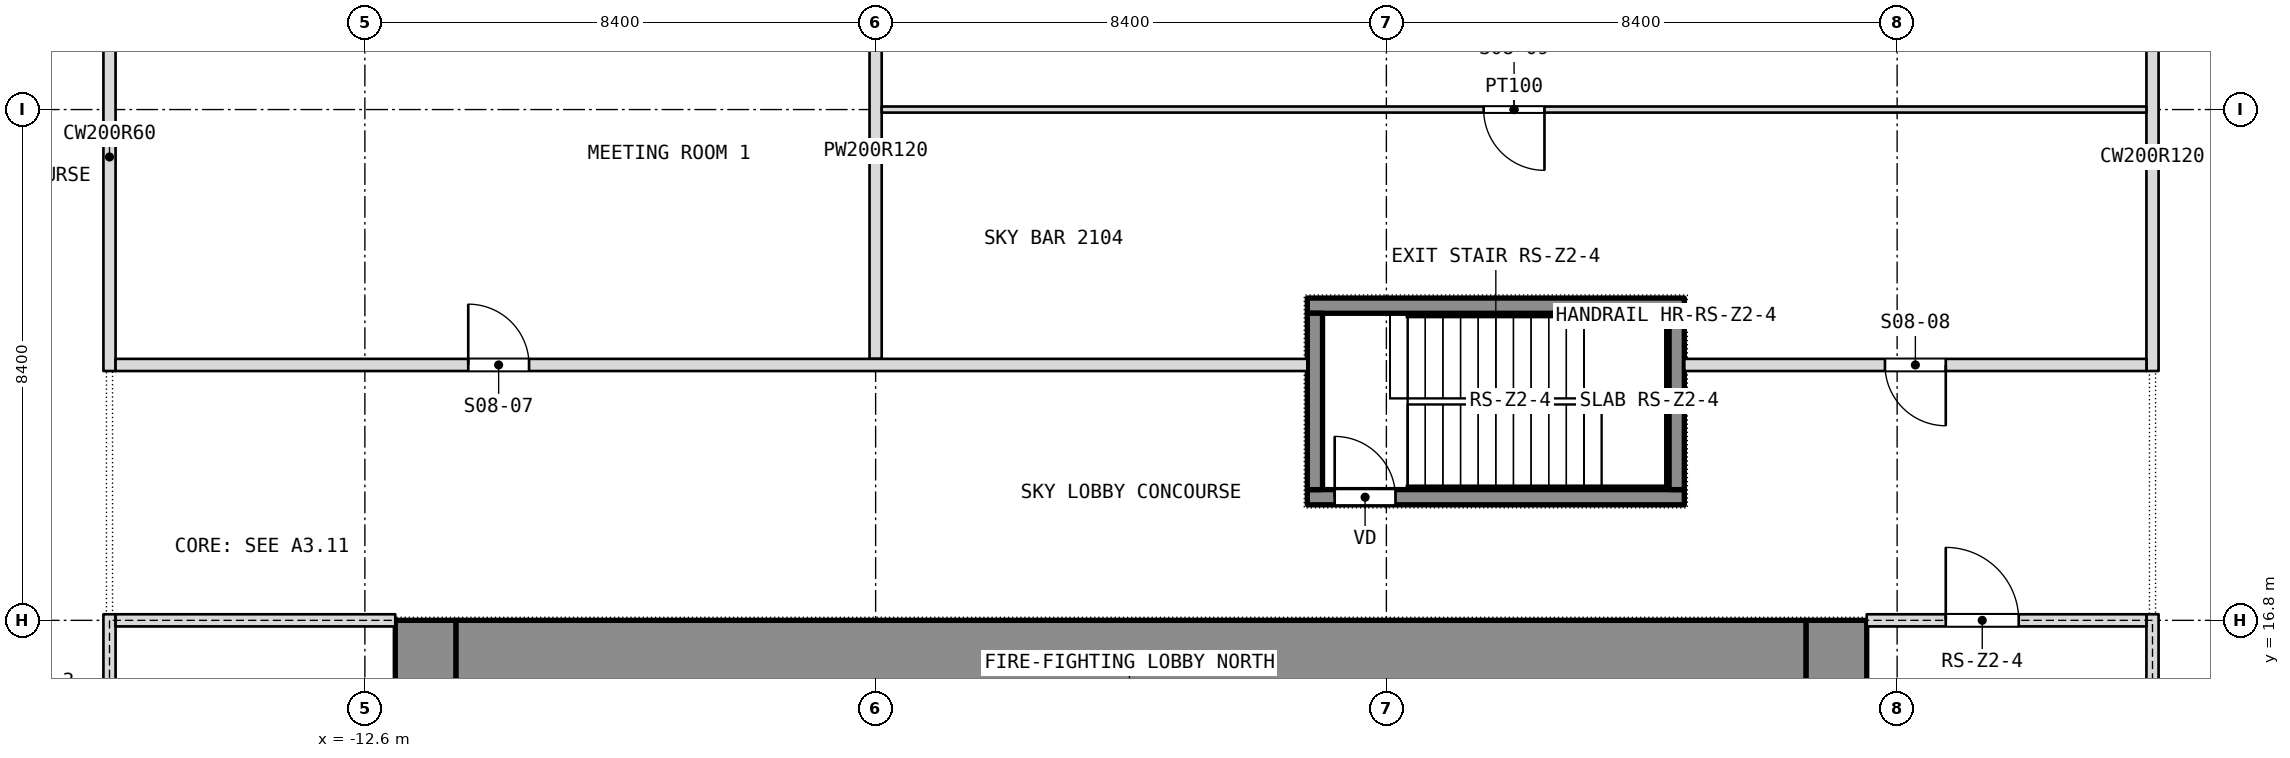
"""IFC4 building model, lengths in metres.
Left out: names, types, materials, properties, quantities, classifications, styles, units other than length and angle.
Written with IfcOpenShell. Run it as: python <this file> out.ifc"""

import sys

from ifc_helpers import new_model, si_unit, direction, frame, frame_2d, origin, place, context, subcontext, project, spatial, rectangle, extrude, element, fill, save


model = new_model("IFC4")
c1 = context("Model", 3, precision=1e-05, world=origin(), true_north=direction((0.0, 1.0)))
c2 = subcontext(c1, "Body", "Model", "MODEL_VIEW")
j1 = project(units=[si_unit("LENGTHUNIT", "METRE"), si_unit("PLANEANGLEUNIT", "RADIAN")], contexts=[c1])
p1 = place(None, origin())
s1 = spatial("IfcSite", under=j1, at=p1, CompositionType="ELEMENT")
p2 = place(p1, origin())
s2 = spatial("IfcBuilding", under=s1, at=p2, CompositionType="ELEMENT")
p3 = place(p2, frame((0.0, 0.0, 97.7)))
s3 = spatial("IfcBuildingStorey", under=s2, at=p3, CompositionType="ELEMENT", Elevation=97.7)
p4 = place(p3, frame((11.6, 0.0, 0.0), z_axis=(0.0, 0.0, 1.0), x_axis=(0.0, 1.0, 0.0)))
e1 = element("IfcWall", 1, at=p4, inside=s3, PredefinedType="SHEAR", context=c2, shape_type="SweptSolid", body=[
    extrude(rectangle(XDim=16.8, YDim=1.0, at=frame_2d((8.4, 0.0))), origin(), (0.0, 0.0, 1.0), 7.2),
])
p5 = place(p4, frame((2.3, 0.0, 0.0)))
e2 = element("IfcOpeningElement", 2, at=p5, cuts=e1, PredefinedType="OPENING", context=c2, shape_type="SweptSolid", body=[
    extrude(rectangle(XDim=1.1, YDim=2.1, at=frame_2d((0.55, 1.05))), frame((0.0, 0.5, 0.0), z_axis=(0.0, -1.0, 0.0), x_axis=(1.0, 0.0, 0.0)), (0.0, 0.0, 1.0), 1.0),
])
p6 = place(p4, frame((4.85, 0.0, 0.0)))
e3 = element("IfcOpeningElement", 3, at=p6, cuts=e1, PredefinedType="OPENING", context=c2, shape_type="SweptSolid", body=[
    extrude(rectangle(XDim=1.1, YDim=2.1, at=frame_2d((0.55, 1.05))), frame((0.0, 0.5, 0.0), z_axis=(0.0, -1.0, 0.0), x_axis=(1.0, 0.0, 0.0)), (0.0, 0.0, 1.0), 1.0),
])
p7 = place(p4, frame((6.825, 0.0, 0.0)))
e4 = element("IfcOpeningElement", 4, at=p7, cuts=e1, PredefinedType="OPENING", context=c2, shape_type="SweptSolid", body=[
    extrude(rectangle(XDim=1.2, YDim=2.1, at=frame_2d((0.6, 1.05))), frame((0.0, 0.5, 0.0), z_axis=(0.0, -1.0, 0.0), x_axis=(1.0, 0.0, 0.0)), (0.0, 0.0, 1.0), 1.0),
])
p8 = place(p4, frame((13.4, 0.0, 0.0)))
e5 = element("IfcOpeningElement", 5, at=p8, cuts=e1, PredefinedType="OPENING", context=c2, shape_type="SweptSolid", body=[
    extrude(rectangle(XDim=1.1, YDim=2.1, at=frame_2d((0.55, 1.05))), frame((0.0, 0.5, 0.0), z_axis=(0.0, -1.0, 0.0), x_axis=(1.0, 0.0, 0.0)), (0.0, 0.0, 1.0), 1.0),
])
p9 = place(p4, frame((10.85, 0.0, 0.0)))
e6 = element("IfcOpeningElement", 6, at=p9, cuts=e1, PredefinedType="OPENING", context=c2, shape_type="SweptSolid", body=[
    extrude(rectangle(XDim=1.1, YDim=2.1, at=frame_2d((0.55, 1.05))), frame((0.0, 0.5, 0.0), z_axis=(0.0, -1.0, 0.0), x_axis=(1.0, 0.0, 0.0)), (0.0, 0.0, 1.0), 1.0),
])
p10 = place(p4, frame((8.775, 0.0, 0.0)))
e7 = element("IfcOpeningElement", 7, at=p10, cuts=e1, PredefinedType="OPENING", context=c2, shape_type="SweptSolid", body=[
    extrude(rectangle(XDim=1.2, YDim=2.1, at=frame_2d((0.6, 1.05))), frame((0.0, 0.5, 0.0), z_axis=(0.0, -1.0, 0.0), x_axis=(1.0, 0.0, 0.0)), (0.0, 0.0, 1.0), 1.0),
])
p11 = place(p3, frame((-11.6, 0.0, 0.0), z_axis=(0.0, 0.0, 1.0), x_axis=(0.0, 1.0, 0.0)))
e8 = element("IfcWall", 8, at=p11, inside=s3, PredefinedType="SHEAR", context=c2, shape_type="SweptSolid", body=[
    extrude(rectangle(XDim=16.8, YDim=1.0, at=frame_2d((8.4, 0.0))), origin(), (0.0, 0.0, 1.0), 7.2),
])
p12 = place(p11, frame((2.3, 0.0, 0.0)))
e9 = element("IfcOpeningElement", 9, at=p12, cuts=e8, PredefinedType="OPENING", context=c2, shape_type="SweptSolid", body=[
    extrude(rectangle(XDim=1.1, YDim=2.1, at=frame_2d((0.55, 1.05))), frame((0.0, 0.5, 0.0), z_axis=(0.0, -1.0, 0.0), x_axis=(1.0, 0.0, 0.0)), (0.0, 0.0, 1.0), 1.0),
])
p13 = place(p11, frame((4.85, 0.0, 0.0)))
e10 = element("IfcOpeningElement", 10, at=p13, cuts=e8, PredefinedType="OPENING", context=c2, shape_type="SweptSolid", body=[
    extrude(rectangle(XDim=1.1, YDim=2.1, at=frame_2d((0.55, 1.05))), frame((0.0, 0.5, 0.0), z_axis=(0.0, -1.0, 0.0), x_axis=(1.0, 0.0, 0.0)), (0.0, 0.0, 1.0), 1.0),
])
p14 = place(p11, frame((6.825, 0.0, 0.0)))
e11 = element("IfcOpeningElement", 11, at=p14, cuts=e8, PredefinedType="OPENING", context=c2, shape_type="SweptSolid", body=[
    extrude(rectangle(XDim=1.2, YDim=2.1, at=frame_2d((0.6, 1.05))), frame((0.0, 0.5, 0.0), z_axis=(0.0, -1.0, 0.0), x_axis=(1.0, 0.0, 0.0)), (0.0, 0.0, 1.0), 1.0),
])
p15 = place(p11, frame((13.4, 0.0, 0.0)))
e12 = element("IfcOpeningElement", 12, at=p15, cuts=e8, PredefinedType="OPENING", context=c2, shape_type="SweptSolid", body=[
    extrude(rectangle(XDim=1.1, YDim=2.1, at=frame_2d((0.55, 1.05))), frame((0.0, 0.5, 0.0), z_axis=(0.0, -1.0, 0.0), x_axis=(1.0, 0.0, 0.0)), (0.0, 0.0, 1.0), 1.0),
])
p16 = place(p11, frame((10.85, 0.0, 0.0)))
e13 = element("IfcOpeningElement", 13, at=p16, cuts=e8, PredefinedType="OPENING", context=c2, shape_type="SweptSolid", body=[
    extrude(rectangle(XDim=1.1, YDim=2.1, at=frame_2d((0.55, 1.05))), frame((0.0, 0.5, 0.0), z_axis=(0.0, -1.0, 0.0), x_axis=(1.0, 0.0, 0.0)), (0.0, 0.0, 1.0), 1.0),
])
p17 = place(p11, frame((8.775, 0.0, 0.0)))
e14 = element("IfcOpeningElement", 14, at=p17, cuts=e8, PredefinedType="OPENING", context=c2, shape_type="SweptSolid", body=[
    extrude(rectangle(XDim=1.2, YDim=2.1, at=frame_2d((0.6, 1.05))), frame((0.0, 0.5, 0.0), z_axis=(0.0, -1.0, 0.0), x_axis=(1.0, 0.0, 0.0)), (0.0, 0.0, 1.0), 1.0),
])
p18 = place(p3, frame((-11.1, 16.3, 0.0), z_axis=(0.0, 0.0, 1.0), x_axis=(1.0, 0.0, 0.0)))
e15 = element("IfcWall", 15, at=p18, inside=s3, PredefinedType="SHEAR", context=c2, shape_type="SweptSolid", body=[
    extrude(rectangle(XDim=22.2, YDim=1.0, at=frame_2d((11.1, 0.0))), origin(), (0.0, 0.0, 1.0), 7.2),
])
p19 = place(p3, frame((16.8, 20.9, 0.0), z_axis=(0.0, 0.0, 1.0), x_axis=(0.0, 1.0, 0.0)))
e16 = element("IfcWall", 16, at=p19, inside=s3, PredefinedType="PARTITIONING", context=c2, shape_type="SweptSolid", body=[
    extrude(rectangle(XDim=7.04, YDim=0.2, at=frame_2d((3.52, 0.0))), origin(), (0.0, 0.0, 1.0), 6.94),
])
p20 = place(p3, frame((-4.2, 21.1, 0.0), z_axis=(0.0, 0.0, 1.0), x_axis=(0.0, 1.0, 0.0)))
e17 = element("IfcWall", 17, at=p20, inside=s3, PredefinedType="PARTITIONING", context=c2, shape_type="SweptSolid", body=[
    extrude(rectangle(XDim=6.84, YDim=0.2, at=frame_2d((3.42, 0.0))), origin(), (0.0, 0.0, 1.0), 6.94),
])
p21 = place(p3, frame((-16.8, 20.9, 0.0), z_axis=(0.0, 0.0, 1.0), x_axis=(0.0, 1.0, 0.0)))
e18 = element("IfcWall", 18, at=p21, inside=s3, PredefinedType="PARTITIONING", context=c2, shape_type="SweptSolid", body=[
    extrude(rectangle(XDim=7.04, YDim=0.2, at=frame_2d((3.52, 0.0))), origin(), (0.0, 0.0, 1.0), 6.94),
])
p22 = place(p3, frame((-16.7, 21.0, 0.0), z_axis=(0.0, 0.0, 1.0), x_axis=(1.0, 0.0, 0.0)))
e19 = element("IfcWall", 19, at=p22, inside=s3, PredefinedType="PARTITIONING", context=c2, shape_type="SweptSolid", body=[
    extrude(rectangle(XDim=19.6, YDim=0.2, at=frame_2d((9.8, 0.0))), origin(), (0.0, 0.0, 1.0), 6.94),
])
p23 = place(p22, frame((5.8, 0.0, 0.0)))
e20 = element("IfcOpeningElement", 20, at=p23, cuts=e19, PredefinedType="OPENING", context=c2, shape_type="SweptSolid", body=[
    extrude(rectangle(XDim=1.0, YDim=2.1, at=frame_2d((0.5, 1.05))), frame((0.0, 0.1, 0.0), z_axis=(0.0, -1.0, 0.0), x_axis=(1.0, 0.0, 0.0)), (0.0, 0.0, 1.0), 0.2),
])
p24 = place(p3, frame((9.1, 21.0, 0.0), z_axis=(0.0, 0.0, 1.0), x_axis=(1.0, 0.0, 0.0)))
e21 = element("IfcWall", 21, at=p24, inside=s3, PredefinedType="PARTITIONING", context=c2, shape_type="SweptSolid", body=[
    extrude(rectangle(XDim=7.6, YDim=0.2, at=frame_2d((3.8, 0.0))), origin(), (0.0, 0.0, 1.0), 6.94),
])
p25 = place(p24, frame((3.3, 0.0, 0.0)))
e22 = element("IfcOpeningElement", 22, at=p25, cuts=e21, PredefinedType="OPENING", context=c2, shape_type="SweptSolid", body=[
    extrude(rectangle(XDim=1.0, YDim=2.1, at=frame_2d((0.5, 1.05))), frame((0.0, 0.1, 0.0), z_axis=(0.0, -1.0, 0.0), x_axis=(1.0, 0.0, 0.0)), (0.0, 0.0, 1.0), 0.2),
])
p26 = place(p3, frame((-4.1, 25.2, 0.0), z_axis=(0.0, 0.0, 1.0), x_axis=(1.0, 0.0, 0.0)))
e23 = element("IfcWall", 23, at=p26, inside=s3, PredefinedType="PARTITIONING", context=c2, shape_type="SweptSolid", body=[
    extrude(rectangle(XDim=20.8, YDim=0.1, at=frame_2d((10.4, 0.0))), origin(), (0.0, 0.0, 1.0), 6.49),
])
p27 = place(p26, frame((9.9, 0.0, 0.0)))
e24 = element("IfcOpeningElement", 24, at=p27, cuts=e23, PredefinedType="OPENING", context=c2, shape_type="SweptSolid", body=[
    extrude(rectangle(XDim=1.0, YDim=2.1, at=frame_2d((0.5, 1.05))), frame((0.0, 0.05, 0.0), z_axis=(0.0, -1.0, 0.0), x_axis=(1.0, 0.0, 0.0)), (0.0, 0.0, 1.0), 0.1),
])
p28 = place(p3, frame((-16.8, -0.1, 0.0), z_axis=(0.0, 0.0, 1.0), x_axis=(0.0, 1.0, 0.0)))
e25 = element("IfcWall", 25, at=p28, inside=s3, PredefinedType="PARTITIONING", context=c2, shape_type="SweptSolid", body=[
    extrude(rectangle(XDim=17.0, YDim=0.2, at=frame_2d((8.5, 0.0))), origin(), (0.0, 0.0, 1.0), 6.94),
])
p29 = place(p28, frame((1.9, 0.0, 0.0)))
e26 = element("IfcOpeningElement", 26, at=p29, cuts=e25, PredefinedType="OPENING", context=c2, shape_type="SweptSolid", body=[
    extrude(rectangle(XDim=2.4, YDim=2.1, at=frame_2d((1.2, 1.05))), frame((0.0, 0.1, 0.0), z_axis=(0.0, -1.0, 0.0), x_axis=(1.0, 0.0, 0.0)), (0.0, 0.0, 1.0), 0.2),
])
p30 = place(p28, frame((4.4, 0.0, 0.0)))
e27 = element("IfcOpeningElement", 27, at=p30, cuts=e25, PredefinedType="OPENING", context=c2, shape_type="SweptSolid", body=[
    extrude(rectangle(XDim=2.4, YDim=2.1, at=frame_2d((1.2, 1.05))), frame((0.0, 0.1, 0.0), z_axis=(0.0, -1.0, 0.0), x_axis=(1.0, 0.0, 0.0)), (0.0, 0.0, 1.0), 0.2),
])
p31 = place(p3, frame((-16.7, 16.8, 0.0), z_axis=(0.0, 0.0, 1.0), x_axis=(1.0, 0.0, 0.0)))
e28 = element("IfcWall", 28, at=p31, inside=s3, PredefinedType="PARTITIONING", context=c2, shape_type="SweptSolid", body=[
    extrude(rectangle(XDim=4.6, YDim=0.2, at=frame_2d((2.3, 0.0))), origin(), (0.0, 0.0, 1.0), 6.49),
])
p32 = place(p3, frame((16.8, -0.1, 0.0), z_axis=(0.0, 0.0, 1.0), x_axis=(0.0, 1.0, 0.0)))
e29 = element("IfcWall", 29, at=p32, inside=s3, PredefinedType="PARTITIONING", context=c2, shape_type="SweptSolid", body=[
    extrude(rectangle(XDim=17.0, YDim=0.2, at=frame_2d((8.5, 0.0))), origin(), (0.0, 0.0, 1.0), 6.94),
])
p33 = place(p32, frame((1.9, 0.0, 0.0)))
e30 = element("IfcOpeningElement", 30, at=p33, cuts=e29, PredefinedType="OPENING", context=c2, shape_type="SweptSolid", body=[
    extrude(rectangle(XDim=2.4, YDim=2.1, at=frame_2d((1.2, 1.05))), frame((0.0, 0.1, 0.0), z_axis=(0.0, -1.0, 0.0), x_axis=(1.0, 0.0, 0.0)), (0.0, 0.0, 1.0), 0.2),
])
p34 = place(p32, frame((12.7, 0.0, 0.0)))
e31 = element("IfcOpeningElement", 31, at=p34, cuts=e29, PredefinedType="OPENING", context=c2, shape_type="SweptSolid", body=[
    extrude(rectangle(XDim=2.4, YDim=2.1, at=frame_2d((1.2, 1.05))), frame((0.0, 0.1, 0.0), z_axis=(0.0, -1.0, 0.0), x_axis=(1.0, 0.0, 0.0)), (0.0, 0.0, 1.0), 0.2),
])
p35 = place(p3, frame((12.1, 16.8, 0.0), z_axis=(0.0, 0.0, 1.0), x_axis=(1.0, 0.0, 0.0)))
e32 = element("IfcWall", 32, at=p35, inside=s3, PredefinedType="PARTITIONING", context=c2, shape_type="SweptSolid", body=[
    extrude(rectangle(XDim=4.6, YDim=0.2, at=frame_2d((2.3, 0.0))), origin(), (0.0, 0.0, 1.0), 6.49),
])
p36 = place(p35, frame((1.3, 0.0, 0.0)))
e33 = element("IfcOpeningElement", 33, at=p36, cuts=e32, PredefinedType="OPENING", context=c2, shape_type="SweptSolid", body=[
    extrude(rectangle(XDim=1.2, YDim=2.1, at=frame_2d((0.6, 1.05))), frame((0.0, 0.1, 0.0), z_axis=(0.0, -1.0, 0.0), x_axis=(1.0, 0.0, 0.0)), (0.0, 0.0, 1.0), 0.2),
])
p37 = place(p3, frame((2.9, 18.825, -0.26), z_axis=(0.0, 0.0, 1.0), x_axis=(1.0, 0.0, 0.0)))
e34 = element("IfcWall", 34, at=p37, inside=s3, PredefinedType="SHEAR", context=c2, shape_type="SweptSolid", body=[
    extrude(rectangle(XDim=6.2, YDim=0.25, at=frame_2d((3.1, 0.0))), origin(), (0.0, 0.0, 1.0), 7.56),
])
p38 = place(p37, frame((0.45, 0.0, 0.0)))
e35 = element("IfcOpeningElement", 35, at=p38, cuts=e34, PredefinedType="OPENING", context=c2, shape_type="SweptSolid", body=[
    extrude(rectangle(XDim=1.0, YDim=2.1, at=frame_2d((0.5, 1.05))), frame((0.0, 0.125, 0.0), z_axis=(0.0, -1.0, 0.0), x_axis=(1.0, 0.0, 0.0)), (0.0, 0.0, 1.0), 0.25),
])
p39 = place(p3, frame((2.9, 21.975, -0.26), z_axis=(0.0, 0.0, 1.0), x_axis=(1.0, 0.0, 0.0)))
e36 = element("IfcWall", 36, at=p39, inside=s3, PredefinedType="SHEAR", context=c2, shape_type="SweptSolid", body=[
    extrude(rectangle(XDim=6.2, YDim=0.25, at=frame_2d((3.1, 0.0))), origin(), (0.0, 0.0, 1.0), 7.56),
])
for number, where, z_axis, x_axis in (
    (37, (3.025, 18.95, -0.26), (0.0, 0.0, 1.0), (0.0, 1.0, 0.0)),
    (38, (8.975, 18.95, -0.26), (0.0, 0.0, 1.0), (0.0, 1.0, 0.0)),
):
    element("IfcWall", number, at=place(p3, frame(where, z_axis=z_axis, x_axis=x_axis)), inside=s3, PredefinedType="SHEAR", context=c2, shape_type="SweptSolid", body=[
        extrude(rectangle(XDim=2.9, YDim=0.25, at=frame_2d((1.45, 0.0))), origin(), (0.0, 0.0, 1.0), 7.56),
    ])
p40 = place(p23, origin())
e39 = element("IfcDoor", 39, at=p40, inside=s3, OperationType="SINGLE_SWING_LEFT", PredefinedType="DOOR", context=c2, shape_type="SweptSolid", body=[
    extrude(rectangle(XDim=1.0, YDim=2.1, at=frame_2d((0.5, 1.05))), frame((0.0, 0.025, 0.0), z_axis=(0.0, -1.0, 0.0), x_axis=(1.0, 0.0, 0.0)), (0.0, 0.0, 1.0), 0.05),
])
fill(e20, e39)
p41 = place(p25, origin())
e40 = element("IfcDoor", 40, at=p41, inside=s3, OperationType="SINGLE_SWING_LEFT", PredefinedType="DOOR", context=c2, shape_type="SweptSolid", body=[
    extrude(rectangle(XDim=1.0, YDim=2.1, at=frame_2d((0.5, 1.05))), frame((0.0, 0.025, 0.0), z_axis=(0.0, -1.0, 0.0), x_axis=(1.0, 0.0, 0.0)), (0.0, 0.0, 1.0), 0.05),
])
fill(e22, e40)
p42 = place(p27, origin())
e41 = element("IfcDoor", 41, at=p42, inside=s3, OperationType="SINGLE_SWING_LEFT", PredefinedType="DOOR", context=c2, shape_type="SweptSolid", body=[
    extrude(rectangle(XDim=1.0, YDim=2.1, at=frame_2d((0.5, 1.05))), frame((0.0, 0.025, 0.0), z_axis=(0.0, -1.0, 0.0), x_axis=(1.0, 0.0, 0.0)), (0.0, 0.0, 1.0), 0.05),
])
fill(e24, e41)
p43 = place(p38, origin())
e42 = element("IfcDoor", 42, at=p43, inside=s3, OperationType="SINGLE_SWING_LEFT", PredefinedType="DOOR", context=c2, shape_type="SweptSolid", body=[
    extrude(rectangle(XDim=1.0, YDim=2.1, at=frame_2d((0.5, 1.05))), frame((0.0, 0.025, 0.0), z_axis=(0.0, -1.0, 0.0), x_axis=(1.0, 0.0, 0.0)), (0.0, 0.0, 1.0), 0.05),
])
fill(e35, e42)
p44 = place(p36, origin())
e43 = element("IfcDoor", 43, at=p44, inside=s3, OperationType="SINGLE_SWING_LEFT", PredefinedType="DOOR", context=c2, shape_type="SweptSolid", body=[
    extrude(rectangle(XDim=1.2, YDim=2.1, at=frame_2d((0.6, 1.05))), frame((0.0, 0.025, 0.0), z_axis=(0.0, -1.0, 0.0), x_axis=(1.0, 0.0, 0.0)), (0.0, 0.0, 1.0), 0.05),
])
fill(e33, e43)
save(model, sys.argv[1])
